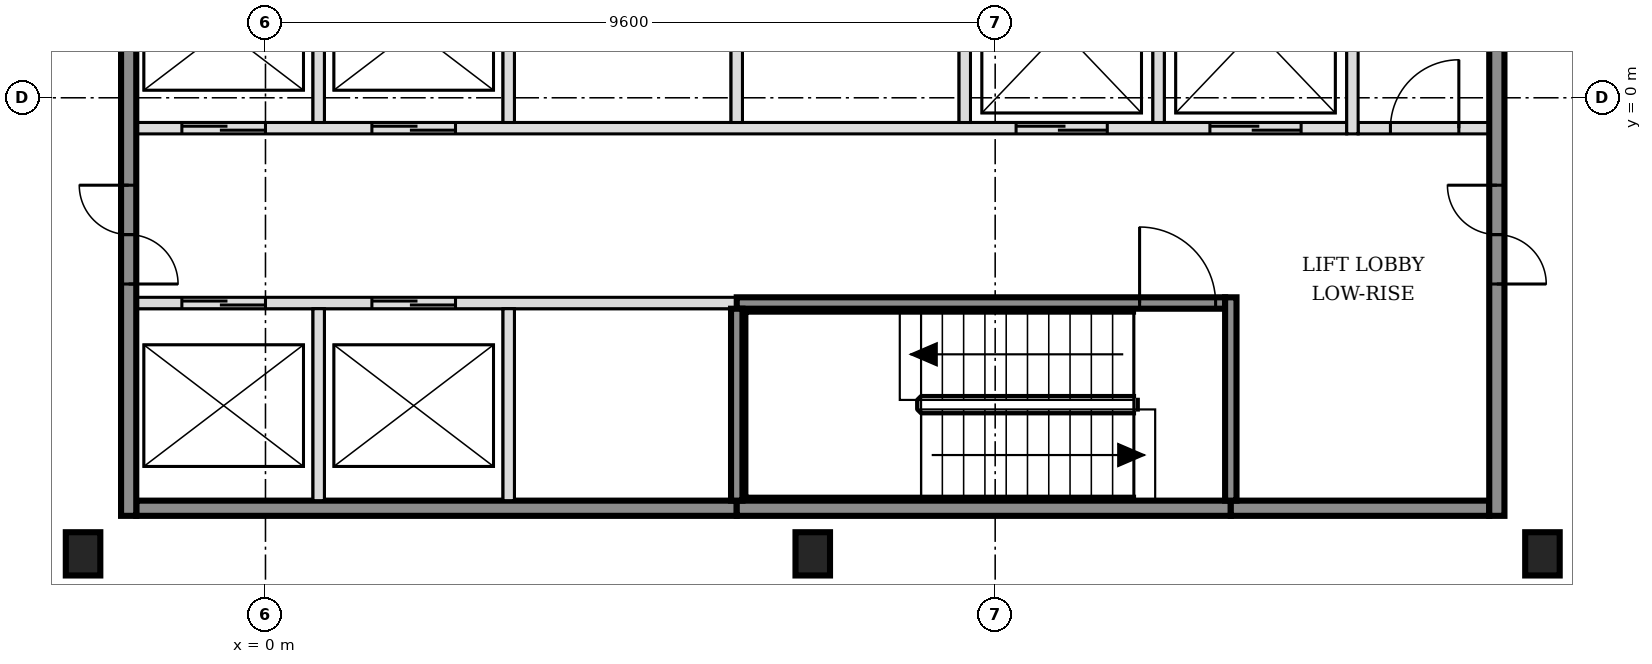
"""IFC4 building model, lengths in metres.
Left out: names, types, materials, properties, quantities, classifications, styles, units other than length and angle.
Written with IfcOpenShell. Run it as: python <this file> out.ifc"""

import sys

from ifc_helpers import new_model, si_unit, direction, frame, frame_2d, origin, origin_2d, place, context, subcontext, project, spatial, rectangle, i_section, extrude, element, fill, save


model = new_model("IFC4")
c1 = context("Model", 3, precision=1e-05, world=origin(), true_north=direction((0.0, 1.0)))
c2 = subcontext(c1, "Body", "Model", "MODEL_VIEW")
j1 = project(units=[si_unit("LENGTHUNIT", "METRE"), si_unit("PLANEANGLEUNIT", "RADIAN")], contexts=[c1])
p1 = place(None, origin())
s1 = spatial("IfcSite", under=j1, at=p1, CompositionType="ELEMENT")
p2 = place(p1, origin())
s2 = spatial("IfcBuilding", under=s1, at=p2, CompositionType="ELEMENT")
p3 = place(p2, frame((0.0, 0.0, 54.6)))
s3 = spatial("IfcBuildingStorey", under=s2, at=p3, CompositionType="ELEMENT", Elevation=54.6)
for number, where, z_axis, x_axis in (
    (1, (-2.4, -6.0, -0.15), (0.0, 0.0, 1.0), (1.0, 0.0, 0.0)),
    (2, (7.2, -6.0, -0.15), (0.0, 0.0, 1.0), (1.0, 0.0, 0.0)),
    (3, (16.8, -6.0, -0.15), (0.0, 0.0, 1.0), (1.0, 0.0, 0.0)),
):
    element("IfcColumn", number, at=place(p3, frame(where, z_axis=z_axis, x_axis=x_axis)), inside=s3, PredefinedType="COLUMN", context=c2, shape_type="SweptSolid", body=[
        extrude(i_section(OverallWidth=0.454, OverallDepth=0.569, WebThickness=0.078, FlangeThickness=0.125, FilletRadius=0.015, at=origin_2d()), origin(), (0.0, 0.0, 1.0), 3.6),
    ])
p4 = place(p3, frame((-1.7, -5.4, 0.0), z_axis=(0.0, 0.0, 1.0), x_axis=(1.0, 0.0, 0.0)))
e4 = element("IfcWall", 4, at=p4, inside=s3, PredefinedType="SOLIDWALL", context=c2, shape_type="SweptSolid", body=[
    extrude(rectangle(XDim=7.9, YDim=0.2, at=frame_2d((3.95, 0.0))), origin(), (0.0, 0.0, 1.0), 3.45),
])
p5 = place(p3, frame((6.2, -5.4, 0.0), z_axis=(0.0, 0.0, 1.0), x_axis=(1.0, 0.0, 0.0)))
e5 = element("IfcWall", 5, at=p5, inside=s3, PredefinedType="SOLIDWALL", context=c2, shape_type="SweptSolid", body=[
    extrude(rectangle(XDim=6.5, YDim=0.2, at=frame_2d((3.25, 0.0))), origin(), (0.0, 0.0, 1.0), 3.45),
])
p6 = place(p3, frame((12.7, -5.4, 0.0), z_axis=(0.0, 0.0, 1.0), x_axis=(1.0, 0.0, 0.0)))
e6 = element("IfcWall", 6, at=p6, inside=s3, PredefinedType="SOLIDWALL", context=c2, shape_type="SweptSolid", body=[
    extrude(rectangle(XDim=3.4, YDim=0.2, at=frame_2d((1.7, 0.0))), origin(), (0.0, 0.0, 1.0), 3.45),
])
p7 = place(p3, frame((-1.7, -2.7, 0.0), z_axis=(0.0, 0.0, 1.0), x_axis=(1.0, 0.0, 0.0)))
e7 = element("IfcWall", 7, at=p7, inside=s3, PredefinedType="SOLIDWALL", context=c2, shape_type="SweptSolid", body=[
    extrude(rectangle(XDim=7.9, YDim=0.15, at=frame_2d((3.95, 0.0))), origin(), (0.0, 0.0, 1.0), 3.45),
])
p8 = place(p7, frame((0.6, 0.0, 0.0)))
e8 = element("IfcOpeningElement", 8, at=p8, cuts=e7, PredefinedType="OPENING", context=c2, shape_type="SweptSolid", body=[
    extrude(rectangle(XDim=1.1, YDim=2.1, at=frame_2d((0.55, 1.05))), frame((0.0, 0.085, 0.0), z_axis=(0.0, -1.0, 0.0), x_axis=(1.0, 0.0, 0.0)), (0.0, 0.0, 1.0), 0.17),
])
p9 = place(p7, frame((3.1, 0.0, 0.0)))
e9 = element("IfcOpeningElement", 9, at=p9, cuts=e7, PredefinedType="OPENING", context=c2, shape_type="SweptSolid", body=[
    extrude(rectangle(XDim=1.1, YDim=2.1, at=frame_2d((0.55, 1.05))), frame((0.0, 0.085, 0.0), z_axis=(0.0, -1.0, 0.0), x_axis=(1.0, 0.0, 0.0)), (0.0, 0.0, 1.0), 0.17),
])
p10 = place(p3, frame((6.2, -2.7, 0.0), z_axis=(0.0, 0.0, 1.0), x_axis=(1.0, 0.0, 0.0)))
e10 = element("IfcWall", 10, at=p10, inside=s3, PredefinedType="SOLIDWALL", context=c2, shape_type="SweptSolid", body=[
    extrude(rectangle(XDim=6.425, YDim=0.15, at=frame_2d((3.212, 0.0))), origin(), (0.0, 0.0, 1.0), 3.45),
])
p11 = place(p10, frame((5.3, 0.0, 0.0)))
e11 = element("IfcOpeningElement", 11, at=p11, cuts=e10, PredefinedType="OPENING", context=c2, shape_type="SweptSolid", body=[
    extrude(rectangle(XDim=1.0, YDim=2.1, at=frame_2d((0.5, 1.05))), frame((0.0, 0.085, 0.0), z_axis=(0.0, -1.0, 0.0), x_axis=(1.0, 0.0, 0.0)), (0.0, 0.0, 1.0), 0.17),
])
p12 = place(p3, frame((-1.7, -0.4, 0.0), z_axis=(0.0, 0.0, 1.0), x_axis=(1.0, 0.0, 0.0)))
e12 = element("IfcWall", 12, at=p12, inside=s3, PredefinedType="SOLIDWALL", context=c2, shape_type="SweptSolid", body=[
    extrude(rectangle(XDim=15.925, YDim=0.15, at=frame_2d((7.962, 0.0))), origin(), (0.0, 0.0, 1.0), 3.45),
])
p13 = place(p12, frame((0.6, 0.0, 0.0)))
e13 = element("IfcOpeningElement", 13, at=p13, cuts=e12, PredefinedType="OPENING", context=c2, shape_type="SweptSolid", body=[
    extrude(rectangle(XDim=1.1, YDim=2.1, at=frame_2d((0.55, 1.05))), frame((0.0, 0.085, 0.0), z_axis=(0.0, -1.0, 0.0), x_axis=(1.0, 0.0, 0.0)), (0.0, 0.0, 1.0), 0.17),
])
p14 = place(p12, frame((3.1, 0.0, 0.0)))
e14 = element("IfcOpeningElement", 14, at=p14, cuts=e12, PredefinedType="OPENING", context=c2, shape_type="SweptSolid", body=[
    extrude(rectangle(XDim=1.1, YDim=2.1, at=frame_2d((0.55, 1.05))), frame((0.0, 0.085, 0.0), z_axis=(0.0, -1.0, 0.0), x_axis=(1.0, 0.0, 0.0)), (0.0, 0.0, 1.0), 0.17),
])
p15 = place(p12, frame((11.575, 0.0, 0.0)))
e15 = element("IfcOpeningElement", 15, at=p15, cuts=e12, PredefinedType="OPENING", context=c2, shape_type="SweptSolid", body=[
    extrude(rectangle(XDim=1.2, YDim=2.1, at=frame_2d((0.6, 1.05))), frame((0.0, 0.085, 0.0), z_axis=(0.0, -1.0, 0.0), x_axis=(1.0, 0.0, 0.0)), (0.0, 0.0, 1.0), 0.17),
])
p16 = place(p12, frame((14.125, 0.0, 0.0)))
e16 = element("IfcOpeningElement", 16, at=p16, cuts=e12, PredefinedType="OPENING", context=c2, shape_type="SweptSolid", body=[
    extrude(rectangle(XDim=1.2, YDim=2.1, at=frame_2d((0.6, 1.05))), frame((0.0, 0.085, 0.0), z_axis=(0.0, -1.0, 0.0), x_axis=(1.0, 0.0, 0.0)), (0.0, 0.0, 1.0), 0.17),
])
p17 = place(p3, frame((14.375, -0.4, 0.0), z_axis=(0.0, 0.0, 1.0), x_axis=(1.0, 0.0, 0.0)))
e17 = element("IfcWall", 17, at=p17, inside=s3, PredefinedType="PARTITIONING", context=c2, shape_type="SweptSolid", body=[
    extrude(rectangle(XDim=1.725, YDim=0.15, at=frame_2d((0.863, 0.0))), origin(), (0.0, 0.0, 1.0), 3.45),
])
p18 = place(p17, frame((0.425, 0.0, 0.0)))
e18 = element("IfcOpeningElement", 18, at=p18, cuts=e17, PredefinedType="OPENING", context=c2, shape_type="SweptSolid", body=[
    extrude(rectangle(XDim=0.9, YDim=2.1, at=frame_2d((0.45, 1.05))), frame((0.0, 0.085, 0.0), z_axis=(0.0, -1.0, 0.0), x_axis=(1.0, 0.0, 0.0)), (0.0, 0.0, 1.0), 0.17),
])
p19 = place(p3, frame((-1.8, -5.5, 0.0), z_axis=(0.0, 0.0, 1.0), x_axis=(0.0, 1.0, 0.0)))
e19 = element("IfcWall", 19, at=p19, inside=s3, PredefinedType="SOLIDWALL", context=c2, shape_type="SweptSolid", body=[
    extrude(rectangle(XDim=15.8, YDim=0.2, at=frame_2d((7.9, 0.0))), origin(), (0.0, 0.0, 1.0), 3.45),
])
p20 = place(p19, frame((3.05, 0.0, 0.0)))
e20 = element("IfcOpeningElement", 20, at=p20, cuts=e19, PredefinedType="OPENING", context=c2, shape_type="SweptSolid", body=[
    extrude(rectangle(XDim=1.3, YDim=2.1, at=frame_2d((0.65, 1.05))), frame((0.0, 0.11, 0.0), z_axis=(0.0, -1.0, 0.0), x_axis=(1.0, 0.0, 0.0)), (0.0, 0.0, 1.0), 0.22),
])
p21 = place(p19, frame((11.45, 0.0, 0.0)))
e21 = element("IfcOpeningElement", 21, at=p21, cuts=e19, PredefinedType="OPENING", context=c2, shape_type="SweptSolid", body=[
    extrude(rectangle(XDim=1.3, YDim=2.1, at=frame_2d((0.65, 1.05))), frame((0.0, 0.11, 0.0), z_axis=(0.0, -1.0, 0.0), x_axis=(1.0, 0.0, 0.0)), (0.0, 0.0, 1.0), 0.22),
])
p22 = place(p3, frame((0.7, -5.3, 0.0), z_axis=(0.0, 0.0, 1.0), x_axis=(0.0, 1.0, 0.0)))
e22 = element("IfcWall", 22, at=p22, inside=s3, PredefinedType="SOLIDWALL", context=c2, shape_type="SweptSolid", body=[
    extrude(rectangle(XDim=2.525, YDim=0.15, at=frame_2d((1.263, 0.0))), origin(), (0.0, 0.0, 1.0), 3.45),
])
p23 = place(p3, frame((0.7, -0.325, 0.0), z_axis=(0.0, 0.0, 1.0), x_axis=(0.0, 1.0, 0.0)))
e23 = element("IfcWall", 23, at=p23, inside=s3, PredefinedType="SOLIDWALL", context=c2, shape_type="SweptSolid", body=[
    extrude(rectangle(XDim=2.45, YDim=0.15, at=frame_2d((1.225, 0.0))), origin(), (0.0, 0.0, 1.0), 3.45),
])
p24 = place(p3, frame((3.2, -5.3, 0.0), z_axis=(0.0, 0.0, 1.0), x_axis=(0.0, 1.0, 0.0)))
e24 = element("IfcWall", 24, at=p24, inside=s3, PredefinedType="SOLIDWALL", context=c2, shape_type="SweptSolid", body=[
    extrude(rectangle(XDim=2.525, YDim=0.15, at=frame_2d((1.263, 0.0))), origin(), (0.0, 0.0, 1.0), 3.45),
])
p25 = place(p3, frame((3.2, -0.325, 0.0), z_axis=(0.0, 0.0, 1.0), x_axis=(0.0, 1.0, 0.0)))
e25 = element("IfcWall", 25, at=p25, inside=s3, PredefinedType="SOLIDWALL", context=c2, shape_type="SweptSolid", body=[
    extrude(rectangle(XDim=2.45, YDim=0.15, at=frame_2d((1.225, 0.0))), origin(), (0.0, 0.0, 1.0), 3.45),
])
p26 = place(p3, frame((6.2, -5.3, 0.0), z_axis=(0.0, 0.0, 1.0), x_axis=(0.0, 1.0, 0.0)))
e26 = element("IfcWall", 26, at=p26, inside=s3, PredefinedType="SOLIDWALL", context=c2, shape_type="SweptSolid", body=[
    extrude(rectangle(XDim=2.525, YDim=0.15, at=frame_2d((1.263, 0.0))), origin(), (0.0, 0.0, 1.0), 3.45),
])
for number, where, z_axis, x_axis in (
    (27, (6.2, -0.325, 0.0), (0.0, 0.0, 1.0), (0.0, 1.0, 0.0)),
    (28, (9.2, -0.325, 0.0), (0.0, 0.0, 1.0), (0.0, 1.0, 0.0)),
    (29, (11.75, -0.325, 0.0), (0.0, 0.0, 1.0), (0.0, 1.0, 0.0)),
):
    element("IfcWall", number, at=place(p3, frame(where, z_axis=z_axis, x_axis=x_axis)), inside=s3, PredefinedType="SOLIDWALL", context=c2, shape_type="SweptSolid", body=[
        extrude(rectangle(XDim=2.45, YDim=0.15, at=frame_2d((1.225, 0.0))), origin(), (0.0, 0.0, 1.0), 3.45),
    ])
p27 = place(p3, frame((12.7, -5.3, 0.0), z_axis=(0.0, 0.0, 1.0), x_axis=(0.0, 1.0, 0.0)))
e30 = element("IfcWall", 30, at=p27, inside=s3, PredefinedType="SOLIDWALL", context=c2, shape_type="SweptSolid", body=[
    extrude(rectangle(XDim=2.675, YDim=0.15, at=frame_2d((1.337, 0.0))), origin(), (0.0, 0.0, 1.0), 3.45),
])
p28 = place(p3, frame((14.3, -0.475, 0.0), z_axis=(0.0, 0.0, 1.0), x_axis=(0.0, 1.0, 0.0)))
e31 = element("IfcWall", 31, at=p28, inside=s3, PredefinedType="SOLIDWALL", context=c2, shape_type="SweptSolid", body=[
    extrude(rectangle(XDim=2.75, YDim=0.15, at=frame_2d((1.375, 0.0))), origin(), (0.0, 0.0, 1.0), 3.45),
])
p29 = place(p3, frame((16.2, -5.5, 0.0), z_axis=(0.0, 0.0, 1.0), x_axis=(0.0, 1.0, 0.0)))
e32 = element("IfcWall", 32, at=p29, inside=s3, PredefinedType="SOLIDWALL", context=c2, shape_type="SweptSolid", body=[
    extrude(rectangle(XDim=15.8, YDim=0.2, at=frame_2d((7.9, 0.0))), origin(), (0.0, 0.0, 1.0), 3.45),
])
p30 = place(p29, frame((3.05, 0.0, 0.0)))
e33 = element("IfcOpeningElement", 33, at=p30, cuts=e32, PredefinedType="OPENING", context=c2, shape_type="SweptSolid", body=[
    extrude(rectangle(XDim=1.3, YDim=2.1, at=frame_2d((0.65, 1.05))), frame((0.0, 0.11, 0.0), z_axis=(0.0, -1.0, 0.0), x_axis=(1.0, 0.0, 0.0)), (0.0, 0.0, 1.0), 0.22),
])
p31 = place(p29, frame((11.45, 0.0, 0.0)))
e34 = element("IfcOpeningElement", 34, at=p31, cuts=e32, PredefinedType="OPENING", context=c2, shape_type="SweptSolid", body=[
    extrude(rectangle(XDim=1.3, YDim=2.1, at=frame_2d((0.65, 1.05))), frame((0.0, 0.11, 0.0), z_axis=(0.0, -1.0, 0.0), x_axis=(1.0, 0.0, 0.0)), (0.0, 0.0, 1.0), 0.22),
])
p32 = place(p8, origin())
e35 = element("IfcDoor", 35, at=p32, inside=s3, OperationType="DOUBLE_DOOR_SLIDING", PredefinedType="DOOR", context=c2, shape_type="SweptSolid", body=[
    extrude(rectangle(XDim=1.1, YDim=2.1, at=frame_2d((0.55, 1.05))), frame((0.0, 0.025, 0.0), z_axis=(0.0, -1.0, 0.0), x_axis=(1.0, 0.0, 0.0)), (0.0, 0.0, 1.0), 0.05),
])
fill(e8, e35)
p33 = place(p9, origin())
e36 = element("IfcDoor", 36, at=p33, inside=s3, OperationType="DOUBLE_DOOR_SLIDING", PredefinedType="DOOR", context=c2, shape_type="SweptSolid", body=[
    extrude(rectangle(XDim=1.1, YDim=2.1, at=frame_2d((0.55, 1.05))), frame((0.0, 0.025, 0.0), z_axis=(0.0, -1.0, 0.0), x_axis=(1.0, 0.0, 0.0)), (0.0, 0.0, 1.0), 0.05),
])
fill(e9, e36)
p34 = place(p13, origin())
e37 = element("IfcDoor", 37, at=p34, inside=s3, OperationType="DOUBLE_DOOR_SLIDING", PredefinedType="DOOR", context=c2, shape_type="SweptSolid", body=[
    extrude(rectangle(XDim=1.1, YDim=2.1, at=frame_2d((0.55, 1.05))), frame((0.0, 0.025, 0.0), z_axis=(0.0, -1.0, 0.0), x_axis=(1.0, 0.0, 0.0)), (0.0, 0.0, 1.0), 0.05),
])
fill(e13, e37)
p35 = place(p14, origin())
e38 = element("IfcDoor", 38, at=p35, inside=s3, OperationType="DOUBLE_DOOR_SLIDING", PredefinedType="DOOR", context=c2, shape_type="SweptSolid", body=[
    extrude(rectangle(XDim=1.1, YDim=2.1, at=frame_2d((0.55, 1.05))), frame((0.0, 0.025, 0.0), z_axis=(0.0, -1.0, 0.0), x_axis=(1.0, 0.0, 0.0)), (0.0, 0.0, 1.0), 0.05),
])
fill(e14, e38)
p36 = place(p15, origin())
e39 = element("IfcDoor", 39, at=p36, inside=s3, OperationType="DOUBLE_DOOR_SLIDING", PredefinedType="DOOR", context=c2, shape_type="SweptSolid", body=[
    extrude(rectangle(XDim=1.2, YDim=2.1, at=frame_2d((0.6, 1.05))), frame((0.0, 0.025, 0.0), z_axis=(0.0, -1.0, 0.0), x_axis=(1.0, 0.0, 0.0)), (0.0, 0.0, 1.0), 0.05),
])
fill(e15, e39)
p37 = place(p16, origin())
e40 = element("IfcDoor", 40, at=p37, inside=s3, OperationType="DOUBLE_DOOR_SLIDING", PredefinedType="DOOR", context=c2, shape_type="SweptSolid", body=[
    extrude(rectangle(XDim=1.2, YDim=2.1, at=frame_2d((0.6, 1.05))), frame((0.0, 0.025, 0.0), z_axis=(0.0, -1.0, 0.0), x_axis=(1.0, 0.0, 0.0)), (0.0, 0.0, 1.0), 0.05),
])
fill(e16, e40)
p38 = place(p11, origin())
e41 = element("IfcDoor", 41, at=p38, inside=s3, OperationType="SINGLE_SWING_LEFT", PredefinedType="DOOR", context=c2, shape_type="SweptSolid", body=[
    extrude(rectangle(XDim=1.0, YDim=2.1, at=frame_2d((0.5, 1.05))), frame((0.0, 0.025, 0.0), z_axis=(0.0, -1.0, 0.0), x_axis=(1.0, 0.0, 0.0)), (0.0, 0.0, 1.0), 0.05),
])
fill(e11, e41)
p39 = place(p20, origin())
e42 = element("IfcDoor", 42, at=p39, inside=s3, OperationType="DOUBLE_DOOR_SINGLE_SWING", PredefinedType="DOOR", context=c2, shape_type="SweptSolid", body=[
    extrude(rectangle(XDim=1.3, YDim=2.1, at=frame_2d((0.65, 1.05))), frame((0.0, 0.025, 0.0), z_axis=(0.0, -1.0, 0.0), x_axis=(1.0, 0.0, 0.0)), (0.0, 0.0, 1.0), 0.05),
])
fill(e20, e42)
p40 = place(p30, origin())
e43 = element("IfcDoor", 43, at=p40, inside=s3, OperationType="DOUBLE_DOOR_SINGLE_SWING", PredefinedType="DOOR", context=c2, shape_type="SweptSolid", body=[
    extrude(rectangle(XDim=1.3, YDim=2.1, at=frame_2d((0.65, 1.05))), frame((0.0, 0.025, 0.0), z_axis=(0.0, -1.0, 0.0), x_axis=(1.0, 0.0, 0.0)), (0.0, 0.0, 1.0), 0.05),
])
fill(e33, e43)
p41 = place(p18, origin())
e44 = element("IfcDoor", 44, at=p41, inside=s3, OperationType="SINGLE_SWING_RIGHT", PredefinedType="DOOR", context=c2, shape_type="SweptSolid", body=[
    extrude(rectangle(XDim=0.9, YDim=2.1, at=frame_2d((0.45, 1.05))), frame((0.0, 0.025, 0.0), z_axis=(0.0, -1.0, 0.0), x_axis=(1.0, 0.0, 0.0)), (0.0, 0.0, 1.0), 0.05),
])
fill(e18, e44)
save(model, sys.argv[1])
